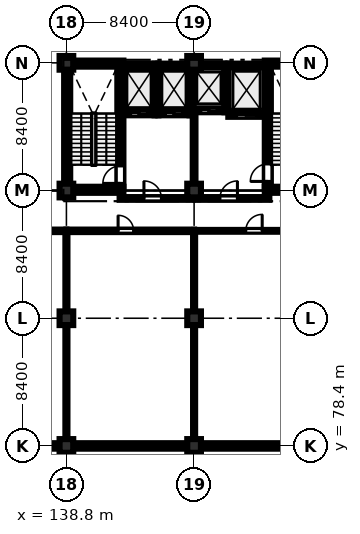
"""IFC4 building model, lengths in metres.
Left out: names, types, materials, properties, quantities, classifications, styles, units other than length and angle.
Written with IfcOpenShell. Run it as: python <this file> out.ifc"""

import sys

from ifc_helpers import new_model, si_unit, direction, frame, frame_2d, origin, origin_2d, place, context, subcontext, project, spatial, rectangle, extrude, element, fill, save


model = new_model("IFC4")
c1 = context("Model", 3, precision=1e-05, world=origin(), true_north=direction((0.0, 1.0)))
c2 = subcontext(c1, "Body", "Model", "MODEL_VIEW")
j1 = project(units=[si_unit("LENGTHUNIT", "METRE"), si_unit("PLANEANGLEUNIT", "RADIAN")], contexts=[c1])
p1 = place(None, origin())
s1 = spatial("IfcSite", under=j1, at=p1, CompositionType="ELEMENT")
p2 = place(p1, origin())
s2 = spatial("IfcBuilding", under=s1, at=p2, CompositionType="ELEMENT")
p3 = place(p2, frame((0.0, 0.0, 19.2)))
s3 = spatial("IfcBuildingStorey", under=s2, at=p3, CompositionType="ELEMENT", Elevation=19.2)
for number, where, z_axis, x_axis in (
    (1, (138.8, 78.4, 0.0), (0.0, 0.0, 1.0), (1.0, 0.0, 0.0)),
    (2, (138.8, 86.8, 0.0), (0.0, 0.0, 1.0), (1.0, 0.0, 0.0)),
    (3, (138.8, 95.2, 0.0), (0.0, 0.0, 1.0), (1.0, 0.0, 0.0)),
    (4, (138.8, 103.6, 0.0), (0.0, 0.0, 1.0), (1.0, 0.0, 0.0)),
    (5, (147.2, 78.4, 0.0), (0.0, 0.0, 1.0), (1.0, 0.0, 0.0)),
    (6, (147.2, 86.8, 0.0), (0.0, 0.0, 1.0), (1.0, 0.0, 0.0)),
    (7, (147.2, 95.2, 0.0), (0.0, 0.0, 1.0), (1.0, 0.0, 0.0)),
    (8, (147.2, 103.6, 0.0), (0.0, 0.0, 1.0), (1.0, 0.0, 0.0)),
):
    element("IfcColumn", number, at=place(p3, frame(where, z_axis=z_axis, x_axis=x_axis)), inside=s3, PredefinedType="COLUMN", context=c2, shape_type="SweptSolid", body=[
        extrude(rectangle(XDim=0.9, YDim=0.9, at=origin_2d()), origin(), (0.0, 0.0, 1.0), 4.02),
    ])
for number, where, z_axis, x_axis in (
    (9, (138.65, 95.25, 0.0), (0.0, 0.0, 1.0), (1.0, 0.0, 0.0)),
    (10, (138.65, 103.55, 0.0), (0.0, 0.0, 1.0), (1.0, 0.0, 0.0)),
):
    element("IfcWall", number, at=place(p3, frame(where, z_axis=z_axis, x_axis=x_axis)), inside=s3, PredefinedType="SHEAR", context=c2, shape_type="SweptSolid", body=[
        extrude(rectangle(XDim=3.9, YDim=0.4, at=frame_2d((1.95, 0.0))), origin(), (0.0, 0.0, 1.0), 4.02),
    ])
p4 = place(p3, frame((138.85, 95.45, 0.0), z_axis=(0.0, 0.0, 1.0), x_axis=(0.0, 1.0, 0.0)))
e11 = element("IfcWall", 11, at=p4, inside=s3, PredefinedType="SHEAR", context=c2, shape_type="SweptSolid", body=[
    extrude(rectangle(XDim=7.9, YDim=0.4, at=frame_2d((3.95, 0.0))), origin(), (0.0, 0.0, 1.0), 4.02),
])
p5 = place(p3, frame((142.35, 95.45, 0.0), z_axis=(0.0, 0.0, 1.0), x_axis=(0.0, 1.0, 0.0)))
e12 = element("IfcWall", 12, at=p5, inside=s3, PredefinedType="SHEAR", context=c2, shape_type="SweptSolid", body=[
    extrude(rectangle(XDim=7.9, YDim=0.4, at=frame_2d((3.95, 0.0))), origin(), (0.0, 0.0, 1.0), 4.02),
])
p6 = place(p5, frame((0.22, 0.0, 0.0)))
e13 = element("IfcOpeningElement", 13, at=p6, cuts=e12, PredefinedType="OPENING", context=c2, shape_type="SweptSolid", body=[
    extrude(rectangle(XDim=1.15, YDim=2.15, at=frame_2d((0.575, 1.075))), frame((0.0, 0.21, 0.0), z_axis=(0.0, -1.0, 0.0), x_axis=(1.0, 0.0, 0.0)), (0.0, 0.0, 1.0), 0.42),
])
for number, where, z_axis, x_axis in (
    (14, (151.85, 95.25, 0.0), (0.0, 0.0, 1.0), (1.0, 0.0, 0.0)),
    (15, (151.85, 103.55, 0.0), (0.0, 0.0, 1.0), (1.0, 0.0, 0.0)),
):
    element("IfcWall", number, at=place(p3, frame(where, z_axis=z_axis, x_axis=x_axis)), inside=s3, PredefinedType="SHEAR", context=c2, shape_type="SweptSolid", body=[
        extrude(rectangle(XDim=3.9, YDim=0.4, at=frame_2d((1.95, 0.0))), origin(), (0.0, 0.0, 1.0), 4.02),
    ])
p7 = place(p3, frame((152.05, 95.45, 0.0), z_axis=(0.0, 0.0, 1.0), x_axis=(0.0, 1.0, 0.0)))
e16 = element("IfcWall", 16, at=p7, inside=s3, PredefinedType="SHEAR", context=c2, shape_type="SweptSolid", body=[
    extrude(rectangle(XDim=7.9, YDim=0.4, at=frame_2d((3.95, 0.0))), origin(), (0.0, 0.0, 1.0), 4.02),
])
p8 = place(p7, frame((0.35, 0.0, 0.0)))
e17 = element("IfcOpeningElement", 17, at=p8, cuts=e16, PredefinedType="OPENING", context=c2, shape_type="SweptSolid", body=[
    extrude(rectangle(XDim=1.15, YDim=2.15, at=frame_2d((0.575, 1.075))), frame((0.0, 0.21, 0.0), z_axis=(0.0, -1.0, 0.0), x_axis=(1.0, 0.0, 0.0)), (0.0, 0.0, 1.0), 0.42),
])
p9 = place(p3, frame((142.55, 100.275, 0.0), z_axis=(0.0, 0.0, 1.0), x_axis=(1.0, 0.0, 0.0)))
e18 = element("IfcWall", 18, at=p9, inside=s3, PredefinedType="SHEAR", context=c2, shape_type="SweptSolid", body=[
    extrude(rectangle(XDim=2.05, YDim=0.25, at=frame_2d((1.025, 0.0))), origin(), (0.0, 0.0, 1.0), 4.02),
])
p10 = place(p9, frame((0.475, 0.0, 0.0)))
e19 = element("IfcOpeningElement", 19, at=p10, cuts=e18, PredefinedType="OPENING", context=c2, shape_type="SweptSolid", body=[
    extrude(rectangle(XDim=1.1, YDim=2.15, at=frame_2d((0.55, 1.075))), frame((0.0, 0.135, 0.0), z_axis=(0.0, -1.0, 0.0), x_axis=(1.0, 0.0, 0.0)), (0.0, 0.0, 1.0), 0.27),
])
p11 = place(p3, frame((142.55, 103.425, 0.0), z_axis=(0.0, 0.0, 1.0), x_axis=(1.0, 0.0, 0.0)))
e20 = element("IfcWall", 20, at=p11, inside=s3, PredefinedType="SHEAR", context=c2, shape_type="SweptSolid", body=[
    extrude(rectangle(XDim=2.05, YDim=0.25, at=frame_2d((1.025, 0.0))), origin(), (0.0, 0.0, 1.0), 4.02),
])
p12 = place(p3, frame((144.725, 100.15, 0.0), z_axis=(0.0, 0.0, 1.0), x_axis=(0.0, 1.0, 0.0)))
e21 = element("IfcWall", 21, at=p12, inside=s3, PredefinedType="SHEAR", context=c2, shape_type="SweptSolid", body=[
    extrude(rectangle(XDim=3.4, YDim=0.25, at=frame_2d((1.7, 0.0))), origin(), (0.0, 0.0, 1.0), 4.02),
])
p13 = place(p3, frame((144.85, 100.275, 0.0), z_axis=(0.0, 0.0, 1.0), x_axis=(1.0, 0.0, 0.0)))
e22 = element("IfcWall", 22, at=p13, inside=s3, PredefinedType="SHEAR", context=c2, shape_type="SweptSolid", body=[
    extrude(rectangle(XDim=2.05, YDim=0.25, at=frame_2d((1.025, 0.0))), origin(), (0.0, 0.0, 1.0), 4.02),
])
p14 = place(p13, frame((0.465, 0.0, 0.0)))
e23 = element("IfcOpeningElement", 23, at=p14, cuts=e22, PredefinedType="OPENING", context=c2, shape_type="SweptSolid", body=[
    extrude(rectangle(XDim=1.12, YDim=2.15, at=frame_2d((0.56, 1.075))), frame((0.0, 0.135, 0.0), z_axis=(0.0, -1.0, 0.0), x_axis=(1.0, 0.0, 0.0)), (0.0, 0.0, 1.0), 0.27),
])
p15 = place(p3, frame((144.85, 103.425, 0.0), z_axis=(0.0, 0.0, 1.0), x_axis=(1.0, 0.0, 0.0)))
e24 = element("IfcWall", 24, at=p15, inside=s3, PredefinedType="SHEAR", context=c2, shape_type="SweptSolid", body=[
    extrude(rectangle(XDim=2.05, YDim=0.25, at=frame_2d((1.025, 0.0))), origin(), (0.0, 0.0, 1.0), 4.02),
])
p16 = place(p3, frame((147.025, 100.15, 0.0), z_axis=(0.0, 0.0, 1.0), x_axis=(0.0, 1.0, 0.0)))
e25 = element("IfcWall", 25, at=p16, inside=s3, PredefinedType="SHEAR", context=c2, shape_type="SweptSolid", body=[
    extrude(rectangle(XDim=3.4, YDim=0.25, at=frame_2d((1.7, 0.0))), origin(), (0.0, 0.0, 1.0), 4.02),
])
p17 = place(p3, frame((147.15, 100.475, 0.0), z_axis=(0.0, 0.0, 1.0), x_axis=(1.0, 0.0, 0.0)))
e26 = element("IfcWall", 26, at=p17, inside=s3, PredefinedType="SHEAR", context=c2, shape_type="SweptSolid", body=[
    extrude(rectangle(XDim=2.05, YDim=0.25, at=frame_2d((1.025, 0.0))), origin(), (0.0, 0.0, 1.0), 4.02),
])
p18 = place(p17, frame((0.495, 0.0, 0.0)))
e27 = element("IfcOpeningElement", 27, at=p18, cuts=e26, PredefinedType="OPENING", context=c2, shape_type="SweptSolid", body=[
    extrude(rectangle(XDim=1.06, YDim=2.15, at=frame_2d((0.53, 1.075))), frame((0.0, 0.135, 0.0), z_axis=(0.0, -1.0, 0.0), x_axis=(1.0, 0.0, 0.0)), (0.0, 0.0, 1.0), 0.27),
])
p19 = place(p3, frame((147.15, 103.425, 0.0), z_axis=(0.0, 0.0, 1.0), x_axis=(1.0, 0.0, 0.0)))
e28 = element("IfcWall", 28, at=p19, inside=s3, PredefinedType="SHEAR", context=c2, shape_type="SweptSolid", body=[
    extrude(rectangle(XDim=2.05, YDim=0.25, at=frame_2d((1.025, 0.0))), origin(), (0.0, 0.0, 1.0), 4.02),
])
p20 = place(p3, frame((149.325, 100.35, 0.0), z_axis=(0.0, 0.0, 1.0), x_axis=(0.0, 1.0, 0.0)))
e29 = element("IfcWall", 29, at=p20, inside=s3, PredefinedType="SHEAR", context=c2, shape_type="SweptSolid", body=[
    extrude(rectangle(XDim=3.2, YDim=0.25, at=frame_2d((1.6, 0.0))), origin(), (0.0, 0.0, 1.0), 4.02),
])
p21 = place(p3, frame((149.45, 100.175, 0.0), z_axis=(0.0, 0.0, 1.0), x_axis=(1.0, 0.0, 0.0)))
e30 = element("IfcWall", 30, at=p21, inside=s3, PredefinedType="SHEAR", context=c2, shape_type="SweptSolid", body=[
    extrude(rectangle(XDim=2.4, YDim=0.25, at=frame_2d((1.2, 0.0))), origin(), (0.0, 0.0, 1.0), 4.02),
])
p22 = place(p21, frame((0.55, 0.0, 0.0)))
e31 = element("IfcOpeningElement", 31, at=p22, cuts=e30, PredefinedType="OPENING", context=c2, shape_type="SweptSolid", body=[
    extrude(rectangle(XDim=1.3, YDim=2.25, at=frame_2d((0.65, 1.125))), frame((0.0, 0.135, 0.0), z_axis=(0.0, -1.0, 0.0), x_axis=(1.0, 0.0, 0.0)), (0.0, 0.0, 1.0), 0.27),
])
p23 = place(p3, frame((149.45, 103.425, 0.0), z_axis=(0.0, 0.0, 1.0), x_axis=(1.0, 0.0, 0.0)))
e32 = element("IfcWall", 32, at=p23, inside=s3, PredefinedType="SHEAR", context=c2, shape_type="SweptSolid", body=[
    extrude(rectangle(XDim=2.4, YDim=0.25, at=frame_2d((1.2, 0.0))), origin(), (0.0, 0.0, 1.0), 4.02),
])
p24 = place(p3, frame((138.35, 78.4, 0.0), z_axis=(0.0, 0.0, 1.0), x_axis=(-1.0, 0.0, 0.0)))
e33 = element("IfcWall", 33, at=p24, inside=s3, PredefinedType="STANDARD", context=c2, shape_type="SweptSolid", body=[
    extrude(rectangle(XDim=7.5, YDim=0.36, at=frame_2d((3.75, 0.0))), origin(), (0.0, 0.0, 1.0), 3.32),
])
p25 = place(p24, frame((1.15, 0.0, 0.95)))
e34 = element("IfcOpeningElement", 34, at=p25, cuts=e33, PredefinedType="OPENING", context=c2, shape_type="SweptSolid", body=[
    extrude(rectangle(XDim=1.5, YDim=1.5, at=frame_2d((0.75, 0.75))), frame((0.0, 0.19, 0.0), z_axis=(0.0, -1.0, 0.0), x_axis=(1.0, 0.0, 0.0)), (0.0, 0.0, 1.0), 0.38),
])
p26 = place(p3, frame((146.75, 78.4, 0.0), z_axis=(0.0, 0.0, 1.0), x_axis=(-1.0, 0.0, 0.0)))
e35 = element("IfcWall", 35, at=p26, inside=s3, PredefinedType="STANDARD", context=c2, shape_type="SweptSolid", body=[
    extrude(rectangle(XDim=7.5, YDim=0.36, at=frame_2d((3.75, 0.0))), origin(), (0.0, 0.0, 1.0), 3.32),
])
p27 = place(p26, frame((1.15, 0.0, 0.95)))
e36 = element("IfcOpeningElement", 36, at=p27, cuts=e35, PredefinedType="OPENING", context=c2, shape_type="SweptSolid", body=[
    extrude(rectangle(XDim=1.5, YDim=1.5, at=frame_2d((0.75, 0.75))), frame((0.0, 0.19, 0.0), z_axis=(0.0, -1.0, 0.0), x_axis=(1.0, 0.0, 0.0)), (0.0, 0.0, 1.0), 0.38),
])
p28 = place(p3, frame((155.15, 78.4, 0.0), z_axis=(0.0, 0.0, 1.0), x_axis=(-1.0, 0.0, 0.0)))
e37 = element("IfcWall", 37, at=p28, inside=s3, PredefinedType="STANDARD", context=c2, shape_type="SweptSolid", body=[
    extrude(rectangle(XDim=7.5, YDim=0.36, at=frame_2d((3.75, 0.0))), origin(), (0.0, 0.0, 1.0), 3.32),
])
p29 = place(p28, frame((1.15, 0.0, 0.95)))
e38 = element("IfcOpeningElement", 38, at=p29, cuts=e37, PredefinedType="OPENING", context=c2, shape_type="SweptSolid", body=[
    extrude(rectangle(XDim=1.5, YDim=1.5, at=frame_2d((0.75, 0.75))), frame((0.0, 0.19, 0.0), z_axis=(0.0, -1.0, 0.0), x_axis=(1.0, 0.0, 0.0)), (0.0, 0.0, 1.0), 0.38),
])
p30 = place(p3, frame((142.3, 94.68, 0.0), z_axis=(0.0, 0.0, 1.0), x_axis=(1.0, 0.0, 0.0)))
e39 = element("IfcWall", 39, at=p30, inside=s3, PredefinedType="STANDARD", context=c2, shape_type="SweptSolid", body=[
    extrude(rectangle(XDim=4.8, YDim=0.18, at=frame_2d((2.4, 0.0))), origin(), (0.0, 0.0, 1.0), 4.02),
])
p31 = place(p30, frame((1.6, 0.0, 0.0)))
e40 = element("IfcOpeningElement", 40, at=p31, cuts=e39, PredefinedType="OPENING", context=c2, shape_type="SweptSolid", body=[
    extrude(rectangle(XDim=1.15, YDim=2.15, at=frame_2d((0.575, 1.075))), frame((0.0, 0.1, 0.0), z_axis=(0.0, -1.0, 0.0), x_axis=(1.0, 0.0, 0.0)), (0.0, 0.0, 1.0), 0.2),
])
p32 = place(p3, frame((147.3, 94.68, 0.0), z_axis=(0.0, 0.0, 1.0), x_axis=(1.0, 0.0, 0.0)))
e41 = element("IfcWall", 41, at=p32, inside=s3, PredefinedType="STANDARD", context=c2, shape_type="SweptSolid", body=[
    extrude(rectangle(XDim=4.85, YDim=0.18, at=frame_2d((2.425, 0.0))), origin(), (0.0, 0.0, 1.0), 4.02),
])
p33 = place(p32, frame((1.6, 0.0, 0.0)))
e42 = element("IfcOpeningElement", 42, at=p33, cuts=e41, PredefinedType="OPENING", context=c2, shape_type="SweptSolid", body=[
    extrude(rectangle(XDim=1.15, YDim=2.15, at=frame_2d((0.575, 1.075))), frame((0.0, 0.1, 0.0), z_axis=(0.0, -1.0, 0.0), x_axis=(1.0, 0.0, 0.0)), (0.0, 0.0, 1.0), 0.2),
])
p34 = place(p3, frame((147.2, 95.75, 0.0), z_axis=(0.0, 0.0, 1.0), x_axis=(0.0, 1.0, 0.0)))
e43 = element("IfcWall", 43, at=p34, inside=s3, PredefinedType="STANDARD", context=c2, shape_type="SweptSolid", body=[
    extrude(rectangle(XDim=4.5, YDim=0.18, at=frame_2d((2.25, 0.0))), origin(), (0.0, 0.0, 1.0), 3.32),
])
p35 = place(p3, frame((122.15, 92.55, 0.0), z_axis=(0.0, 0.0, 1.0), x_axis=(1.0, 0.0, 0.0)))
e44 = element("IfcWall", 44, at=p35, inside=s3, PredefinedType="PARTITIONING", context=c2, shape_type="SweptSolid", body=[
    extrude(rectangle(XDim=16.65, YDim=0.165, at=frame_2d((8.325, 0.0))), origin(), (0.0, 0.0, 1.0), 4.02),
])
p36 = place(p35, frame((3.75, 0.0, 0.0)))
e45 = element("IfcOpeningElement", 45, at=p36, cuts=e44, PredefinedType="OPENING", context=c2, shape_type="SweptSolid", body=[
    extrude(rectangle(XDim=1.7, YDim=2.2, at=frame_2d((0.85, 1.1))), frame((0.0, 0.093, 0.0), z_axis=(0.0, -1.0, 0.0), x_axis=(1.0, 0.0, 0.0)), (0.0, 0.0, 1.0), 0.185),
])
p37 = place(p3, frame((138.8, 92.55, 0.0), z_axis=(0.0, 0.0, 1.0), x_axis=(1.0, 0.0, 0.0)))
e46 = element("IfcWall", 46, at=p37, inside=s3, PredefinedType="PARTITIONING", context=c2, shape_type="SweptSolid", body=[
    extrude(rectangle(XDim=8.4, YDim=0.165, at=frame_2d((4.2, 0.0))), origin(), (0.0, 0.0, 1.0), 4.02),
])
p38 = place(p37, frame((3.4, 0.0, 0.0)))
e47 = element("IfcOpeningElement", 47, at=p38, cuts=e46, PredefinedType="OPENING", context=c2, shape_type="SweptSolid", body=[
    extrude(rectangle(XDim=1.02, YDim=2.15, at=frame_2d((0.51, 1.075))), frame((0.0, 0.093, 0.0), z_axis=(0.0, -1.0, 0.0), x_axis=(1.0, 0.0, 0.0)), (0.0, 0.0, 1.0), 0.185),
])
p39 = place(p3, frame((138.8, 78.55, 0.0), z_axis=(0.0, 0.0, 1.0), x_axis=(0.0, 1.0, 0.0)))
e48 = element("IfcWall", 48, at=p39, inside=s3, PredefinedType="PARTITIONING", context=c2, shape_type="SweptSolid", body=[
    extrude(rectangle(XDim=14.0, YDim=0.135, at=frame_2d((7.0, 0.0))), origin(), (0.0, 0.0, 1.0), 3.32),
])
p40 = place(p3, frame((147.2, 92.55, 0.0), z_axis=(0.0, 0.0, 1.0), x_axis=(1.0, 0.0, 0.0)))
e49 = element("IfcWall", 49, at=p40, inside=s3, PredefinedType="PARTITIONING", context=c2, shape_type="SweptSolid", body=[
    extrude(rectangle(XDim=8.4, YDim=0.12, at=frame_2d((4.2, 0.0))), origin(), (0.0, 0.0, 1.0), 4.02),
])
p41 = place(p40, frame((3.4, 0.0, 0.0)))
e50 = element("IfcOpeningElement", 50, at=p41, cuts=e49, PredefinedType="OPENING", context=c2, shape_type="SweptSolid", body=[
    extrude(rectangle(XDim=1.08, YDim=2.15, at=frame_2d((0.54, 1.075))), frame((0.0, 0.07, 0.0), z_axis=(0.0, -1.0, 0.0), x_axis=(1.0, 0.0, 0.0)), (0.0, 0.0, 1.0), 0.14),
])
p42 = place(p3, frame((147.2, 78.55, 0.0), z_axis=(0.0, 0.0, 1.0), x_axis=(0.0, 1.0, 0.0)))
e51 = element("IfcWall", 51, at=p42, inside=s3, PredefinedType="PARTITIONING", context=c2, shape_type="SweptSolid", body=[
    extrude(rectangle(XDim=14.0, YDim=0.135, at=frame_2d((7.0, 0.0))), origin(), (0.0, 0.0, 1.0), 3.32),
])
p43 = place(p27, origin())
e52 = element("IfcWindow", 52, at=p43, inside=s3, PartitioningType="DOUBLE_PANEL_VERTICAL", PredefinedType="WINDOW", context=c2, shape_type="SweptSolid", body=[
    extrude(rectangle(XDim=1.5, YDim=1.5, at=frame_2d((0.75, 0.75))), frame((0.0, 0.03, 0.0), z_axis=(0.0, -1.0, 0.0), x_axis=(1.0, 0.0, 0.0)), (0.0, 0.0, 1.0), 0.06),
])
fill(e36, e52)
p44 = place(p29, origin())
e53 = element("IfcWindow", 53, at=p44, inside=s3, PartitioningType="DOUBLE_PANEL_VERTICAL", PredefinedType="WINDOW", context=c2, shape_type="SweptSolid", body=[
    extrude(rectangle(XDim=1.5, YDim=1.5, at=frame_2d((0.75, 0.75))), frame((0.0, 0.03, 0.0), z_axis=(0.0, -1.0, 0.0), x_axis=(1.0, 0.0, 0.0)), (0.0, 0.0, 1.0), 0.06),
])
fill(e38, e53)
p45 = place(p31, origin())
e54 = element("IfcDoor", 54, at=p45, inside=s3, OperationType="SINGLE_SWING_LEFT", PredefinedType="DOOR", context=c2, shape_type="SweptSolid", body=[
    extrude(rectangle(XDim=1.15, YDim=2.15, at=frame_2d((0.575, 1.075))), frame((0.0, 0.025, 0.0), z_axis=(0.0, -1.0, 0.0), x_axis=(1.0, 0.0, 0.0)), (0.0, 0.0, 1.0), 0.05),
])
fill(e40, e54)
p46 = place(p33, origin())
e55 = element("IfcDoor", 55, at=p46, inside=s3, OperationType="SINGLE_SWING_RIGHT", PredefinedType="DOOR", context=c2, shape_type="SweptSolid", body=[
    extrude(rectangle(XDim=1.15, YDim=2.15, at=frame_2d((0.575, 1.075))), frame((0.0, 0.025, 0.0), z_axis=(0.0, -1.0, 0.0), x_axis=(1.0, 0.0, 0.0)), (0.0, 0.0, 1.0), 0.05),
])
fill(e42, e55)
p47 = place(p38, origin())
e56 = element("IfcDoor", 56, at=p47, inside=s3, OperationType="SINGLE_SWING_LEFT", PredefinedType="DOOR", context=c2, shape_type="SweptSolid", body=[
    extrude(rectangle(XDim=1.02, YDim=2.15, at=frame_2d((0.51, 1.075))), frame((0.0, 0.025, 0.0), z_axis=(0.0, -1.0, 0.0), x_axis=(1.0, 0.0, 0.0)), (0.0, 0.0, 1.0), 0.05),
])
fill(e47, e56)
p48 = place(p41, origin())
e57 = element("IfcDoor", 57, at=p48, inside=s3, OperationType="SINGLE_SWING_RIGHT", PredefinedType="DOOR", context=c2, shape_type="SweptSolid", body=[
    extrude(rectangle(XDim=1.08, YDim=2.15, at=frame_2d((0.54, 1.075))), frame((0.0, 0.025, 0.0), z_axis=(0.0, -1.0, 0.0), x_axis=(1.0, 0.0, 0.0)), (0.0, 0.0, 1.0), 0.05),
])
fill(e50, e57)
p49 = place(p6, origin())
e58 = element("IfcDoor", 58, at=p49, inside=s3, OperationType="SINGLE_SWING_LEFT", PredefinedType="DOOR", context=c2, shape_type="SweptSolid", body=[
    extrude(rectangle(XDim=1.15, YDim=2.15, at=frame_2d((0.575, 1.075))), frame((0.0, 0.025, 0.0), z_axis=(0.0, -1.0, 0.0), x_axis=(1.0, 0.0, 0.0)), (0.0, 0.0, 1.0), 0.05),
])
fill(e13, e58)
p50 = place(p8, origin())
e59 = element("IfcDoor", 59, at=p50, inside=s3, OperationType="SINGLE_SWING_LEFT", PredefinedType="DOOR", context=c2, shape_type="SweptSolid", body=[
    extrude(rectangle(XDim=1.15, YDim=2.15, at=frame_2d((0.575, 1.075))), frame((0.0, 0.025, 0.0), z_axis=(0.0, -1.0, 0.0), x_axis=(1.0, 0.0, 0.0)), (0.0, 0.0, 1.0), 0.05),
])
fill(e17, e59)
p51 = place(p10, origin())
e60 = element("IfcDoor", 60, at=p51, inside=s3, OperationType="SLIDING_TO_LEFT", PredefinedType="DOOR", context=c2, shape_type="SweptSolid", body=[
    extrude(rectangle(XDim=1.1, YDim=2.15, at=frame_2d((0.55, 1.075))), frame((0.0, 0.025, 0.0), z_axis=(0.0, -1.0, 0.0), x_axis=(1.0, 0.0, 0.0)), (0.0, 0.0, 1.0), 0.05),
])
fill(e19, e60)
p52 = place(p14, origin())
e61 = element("IfcDoor", 61, at=p52, inside=s3, OperationType="SLIDING_TO_LEFT", PredefinedType="DOOR", context=c2, shape_type="SweptSolid", body=[
    extrude(rectangle(XDim=1.12, YDim=2.15, at=frame_2d((0.56, 1.075))), frame((0.0, 0.025, 0.0), z_axis=(0.0, -1.0, 0.0), x_axis=(1.0, 0.0, 0.0)), (0.0, 0.0, 1.0), 0.05),
])
fill(e23, e61)
p53 = place(p18, origin())
e62 = element("IfcDoor", 62, at=p53, inside=s3, OperationType="SLIDING_TO_LEFT", PredefinedType="DOOR", context=c2, shape_type="SweptSolid", body=[
    extrude(rectangle(XDim=1.06, YDim=2.15, at=frame_2d((0.53, 1.075))), frame((0.0, 0.025, 0.0), z_axis=(0.0, -1.0, 0.0), x_axis=(1.0, 0.0, 0.0)), (0.0, 0.0, 1.0), 0.05),
])
fill(e27, e62)
p54 = place(p22, origin())
e63 = element("IfcDoor", 63, at=p54, inside=s3, OperationType="SLIDING_TO_LEFT", PredefinedType="DOOR", context=c2, shape_type="SweptSolid", body=[
    extrude(rectangle(XDim=1.3, YDim=2.25, at=frame_2d((0.65, 1.125))), frame((0.0, 0.025, 0.0), z_axis=(0.0, -1.0, 0.0), x_axis=(1.0, 0.0, 0.0)), (0.0, 0.0, 1.0), 0.05),
])
fill(e31, e63)
save(model, sys.argv[1])
